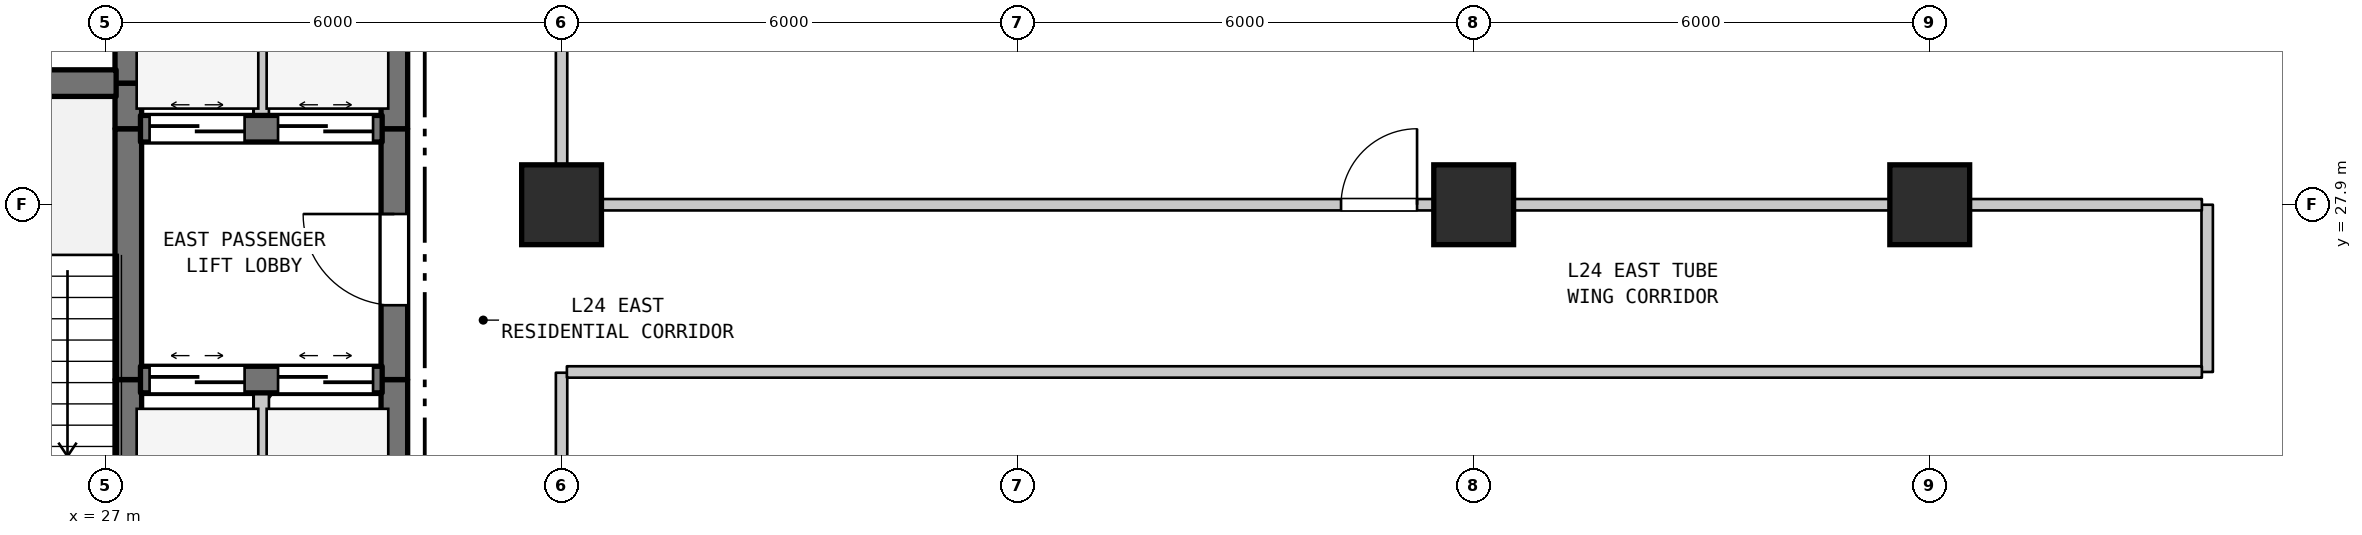
"""IFC4 building model, lengths in metres.
Left out: names, types, materials, properties, quantities, classifications, styles, units other than length and angle.
Written with IfcOpenShell. Run it as: python <this file> out.ifc"""

import sys

from ifc_helpers import new_model, si_unit, direction, frame, frame_2d, origin, origin_2d, place, context, subcontext, project, spatial, rectangle, extrude, element, fill, save


model = new_model("IFC4")
c1 = context("Model", 3, precision=1e-05, world=origin(), true_north=direction((0.0, 1.0)))
c2 = subcontext(c1, "Body", "Model", "MODEL_VIEW")
j1 = project(units=[si_unit("LENGTHUNIT", "METRE"), si_unit("PLANEANGLEUNIT", "RADIAN")], contexts=[c1])
p1 = place(None, origin())
s1 = spatial("IfcSite", under=j1, at=p1, CompositionType="ELEMENT")
p2 = place(p1, origin())
s2 = spatial("IfcBuilding", under=s1, at=p2, CompositionType="ELEMENT")
p3 = place(p2, frame((0.0, 0.0, 102.0)))
s3 = spatial("IfcBuildingStorey", under=s2, at=p3, CompositionType="ELEMENT", Elevation=102.0)
for number, where, z_axis, x_axis in (
    (1, (33.0, 27.9, 0.0), (0.0, 0.0, 1.0), (1.0, 0.0, 0.0)),
    (2, (45.0, 27.9, 0.0), (0.0, 0.0, 1.0), (1.0, 0.0, 0.0)),
    (3, (51.0, 27.9, 0.0), (0.0, 0.0, 1.0), (1.0, 0.0, 0.0)),
):
    element("IfcColumn", number, at=place(p3, frame(where, z_axis=z_axis, x_axis=x_axis)), inside=s3, PredefinedType="COLUMN", context=c2, shape_type="SweptSolid", body=[
        extrude(rectangle(XDim=1.05, YDim=1.05, at=origin_2d()), origin(), (0.0, 0.0, 1.0), 3.7),
    ])
p4 = place(p3, frame((27.3, 22.7, 0.0), z_axis=(0.0, 0.0, 1.0), x_axis=(0.0, 1.0, 0.0)))
e4 = element("IfcWall", 4, at=p4, inside=s3, PredefinedType="SHEAR", context=c2, shape_type="SweptSolid", body=[
    extrude(rectangle(XDim=2.9, YDim=0.35, at=frame_2d((1.45, 0.0))), origin(), (0.0, 0.0, 1.0), 3.385),
])
p5 = place(p3, frame((27.3, 25.6, 0.0), z_axis=(0.0, 0.0, 1.0), x_axis=(0.0, 1.0, 0.0)))
e5 = element("IfcWall", 5, at=p5, inside=s3, PredefinedType="SHEAR", context=c2, shape_type="SweptSolid", body=[
    extrude(rectangle(XDim=3.3, YDim=0.35, at=frame_2d((1.65, 0.0))), origin(), (0.0, 0.0, 1.0), 3.385),
])
p6 = place(p3, frame((27.3, 28.9, 0.0), z_axis=(0.0, 0.0, 1.0), x_axis=(0.0, 1.0, 0.0)))
e6 = element("IfcWall", 6, at=p6, inside=s3, PredefinedType="SHEAR", context=c2, shape_type="SweptSolid", body=[
    extrude(rectangle(XDim=0.6, YDim=0.35, at=frame_2d((0.3, 0.0))), origin(), (0.0, 0.0, 1.0), 3.385),
])
p7 = place(p3, frame((27.3, 29.5, 0.0), z_axis=(0.0, 0.0, 1.0), x_axis=(0.0, 1.0, 0.0)))
e7 = element("IfcWall", 7, at=p7, inside=s3, PredefinedType="SHEAR", context=c2, shape_type="SweptSolid", body=[
    extrude(rectangle(XDim=2.0, YDim=0.35, at=frame_2d((1.0, 0.0))), origin(), (0.0, 0.0, 1.0), 3.385),
])
p8 = place(p3, frame((29.05, 22.7, 0.0), z_axis=(0.0, 0.0, 1.0), x_axis=(0.0, 1.0, 0.0)))
e8 = element("IfcWall", 8, at=p8, inside=s3, PredefinedType="STANDARD", context=c2, shape_type="SweptSolid", body=[
    extrude(rectangle(XDim=2.9, YDim=0.2, at=frame_2d((1.45, 0.0))), origin(), (0.0, 0.0, 1.0), 3.385),
])
p9 = place(p3, frame((29.05, 28.9, 0.0), z_axis=(0.0, 0.0, 1.0), x_axis=(0.0, 1.0, 0.0)))
e9 = element("IfcWall", 9, at=p9, inside=s3, PredefinedType="STANDARD", context=c2, shape_type="SweptSolid", body=[
    extrude(rectangle(XDim=2.6, YDim=0.2, at=frame_2d((1.3, 0.0))), origin(), (0.0, 0.0, 1.0), 3.385),
])
p10 = place(p3, frame((30.8, 22.7, 0.0), z_axis=(0.0, 0.0, 1.0), x_axis=(0.0, 1.0, 0.0)))
e10 = element("IfcWall", 10, at=p10, inside=s3, PredefinedType="SHEAR", context=c2, shape_type="SweptSolid", body=[
    extrude(rectangle(XDim=2.9, YDim=0.35, at=frame_2d((1.45, 0.0))), origin(), (0.0, 0.0, 1.0), 3.385),
])
p11 = place(p3, frame((30.8, 25.6, 0.0), z_axis=(0.0, 0.0, 1.0), x_axis=(0.0, 1.0, 0.0)))
e11 = element("IfcWall", 11, at=p11, inside=s3, PredefinedType="SHEAR", context=c2, shape_type="SweptSolid", body=[
    extrude(rectangle(XDim=3.3, YDim=0.35, at=frame_2d((1.65, 0.0))), origin(), (0.0, 0.0, 1.0), 3.385),
])
p12 = place(p11, frame((0.978, 0.0, 0.0)))
e12 = element("IfcOpeningElement", 12, at=p12, cuts=e11, PredefinedType="OPENING", context=c2, shape_type="SweptSolid", body=[
    extrude(rectangle(XDim=1.2, YDim=2.2, at=frame_2d((0.6, 1.1))), frame((0.0, 0.185, 0.0), z_axis=(0.0, -1.0, 0.0), x_axis=(1.0, 0.0, 0.0)), (0.0, 0.0, 1.0), 0.37),
])
p13 = place(p3, frame((30.8, 28.9, 0.0), z_axis=(0.0, 0.0, 1.0), x_axis=(0.0, 1.0, 0.0)))
e13 = element("IfcWall", 13, at=p13, inside=s3, PredefinedType="SHEAR", context=c2, shape_type="SweptSolid", body=[
    extrude(rectangle(XDim=2.6, YDim=0.35, at=frame_2d((1.3, 0.0))), origin(), (0.0, 0.0, 1.0), 3.385),
])
p14 = place(p3, frame((33.0, 19.51, 0.0), z_axis=(0.0, 0.0, 1.0), x_axis=(0.0, 1.0, 0.0)))
e14 = element("IfcWall", 14, at=p14, inside=s3, PredefinedType="STANDARD", context=c2, shape_type="SweptSolid", body=[
    extrude(rectangle(XDim=6.18, YDim=0.15, at=frame_2d((3.09, 0.0))), origin(), (0.0, 0.0, 1.0), 2.935),
])
p15 = place(p3, frame((33.0, 27.91, 0.0), z_axis=(0.0, 0.0, 1.0), x_axis=(0.0, 1.0, 0.0)))
e15 = element("IfcWall", 15, at=p15, inside=s3, PredefinedType="STANDARD", context=c2, shape_type="SweptSolid", body=[
    extrude(rectangle(XDim=9.98, YDim=0.15, at=frame_2d((4.99, 0.0))), origin(), (0.0, 0.0, 1.0), 2.885),
])
p16 = place(p3, frame((54.65, 25.7, 0.0), z_axis=(0.0, 0.0, 1.0), x_axis=(0.0, 1.0, 0.0)))
e16 = element("IfcWall", 16, at=p16, inside=s3, PredefinedType="STANDARD", context=c2, shape_type="SweptSolid", body=[
    extrude(rectangle(XDim=2.2, YDim=0.15, at=frame_2d((1.1, 0.0))), origin(), (0.0, 0.0, 1.0), 3.385),
])
p17 = place(p3, frame((27.46, 25.6, 0.0), z_axis=(0.0, 0.0, 1.0), x_axis=(1.0, 0.0, 0.0)))
e17 = element("IfcWall", 17, at=p17, inside=s3, PredefinedType="SHEAR", context=c2, shape_type="SweptSolid", body=[
    extrude(rectangle(XDim=3.18, YDim=0.35, at=frame_2d((1.59, 0.0))), origin(), (0.0, 0.0, 1.0), 3.385),
])
p18 = place(p17, frame((0.12, 0.0, 0.0)))
e18 = element("IfcOpeningElement", 18, at=p18, cuts=e17, PredefinedType="OPENING", context=c2, shape_type="SweptSolid", body=[
    extrude(rectangle(XDim=1.25, YDim=2.2, at=frame_2d((0.625, 1.1))), frame((0.0, 0.185, 0.0), z_axis=(0.0, -1.0, 0.0), x_axis=(1.0, 0.0, 0.0)), (0.0, 0.0, 1.0), 0.37),
])
p19 = place(p17, frame((1.81, 0.0, 0.0)))
e19 = element("IfcOpeningElement", 19, at=p19, cuts=e17, PredefinedType="OPENING", context=c2, shape_type="SweptSolid", body=[
    extrude(rectangle(XDim=1.25, YDim=2.2, at=frame_2d((0.625, 1.1))), frame((0.0, 0.185, 0.0), z_axis=(0.0, -1.0, 0.0), x_axis=(1.0, 0.0, 0.0)), (0.0, 0.0, 1.0), 0.37),
])
p20 = place(p3, frame((33.07, 25.7, 0.0), z_axis=(0.0, 0.0, 1.0), x_axis=(1.0, 0.0, 0.0)))
e20 = element("IfcWall", 20, at=p20, inside=s3, PredefinedType="STANDARD", context=c2, shape_type="SweptSolid", body=[
    extrude(rectangle(XDim=21.51, YDim=0.15, at=frame_2d((10.755, 0.0))), origin(), (0.0, 0.0, 1.0), 3.385),
])
p21 = place(p3, frame((33.07, 27.9, 0.0), z_axis=(0.0, 0.0, 1.0), x_axis=(1.0, 0.0, 0.0)))
e21 = element("IfcWall", 21, at=p21, inside=s3, PredefinedType="STANDARD", context=c2, shape_type="SweptSolid", body=[
    extrude(rectangle(XDim=11.93, YDim=0.15, at=frame_2d((5.965, 0.0))), origin(), (0.0, 0.0, 1.0), 2.885),
])
p22 = place(p21, frame((10.185, 0.0, 0.0)))
e22 = element("IfcOpeningElement", 22, at=p22, cuts=e21, PredefinedType="OPENING", context=c2, shape_type="SweptSolid", body=[
    extrude(rectangle(XDim=1.0, YDim=2.15, at=frame_2d((0.5, 1.075))), frame((0.0, 0.085, 0.0), z_axis=(0.0, -1.0, 0.0), x_axis=(1.0, 0.0, 0.0)), (0.0, 0.0, 1.0), 0.17),
])
p23 = place(p3, frame((27.46, 28.9, 0.0), z_axis=(0.0, 0.0, 1.0), x_axis=(1.0, 0.0, 0.0)))
e23 = element("IfcWall", 23, at=p23, inside=s3, PredefinedType="SHEAR", context=c2, shape_type="SweptSolid", body=[
    extrude(rectangle(XDim=3.18, YDim=0.35, at=frame_2d((1.59, 0.0))), origin(), (0.0, 0.0, 1.0), 3.385),
])
p24 = place(p23, frame((0.12, 0.0, 0.0)))
e24 = element("IfcOpeningElement", 24, at=p24, cuts=e23, PredefinedType="OPENING", context=c2, shape_type="SweptSolid", body=[
    extrude(rectangle(XDim=1.25, YDim=2.2, at=frame_2d((0.625, 1.1))), frame((0.0, 0.185, 0.0), z_axis=(0.0, -1.0, 0.0), x_axis=(1.0, 0.0, 0.0)), (0.0, 0.0, 1.0), 0.37),
])
p25 = place(p23, frame((1.81, 0.0, 0.0)))
e25 = element("IfcOpeningElement", 25, at=p25, cuts=e23, PredefinedType="OPENING", context=c2, shape_type="SweptSolid", body=[
    extrude(rectangle(XDim=1.25, YDim=2.2, at=frame_2d((0.625, 1.1))), frame((0.0, 0.185, 0.0), z_axis=(0.0, -1.0, 0.0), x_axis=(1.0, 0.0, 0.0)), (0.0, 0.0, 1.0), 0.37),
])
p26 = place(p3, frame((23.96, 29.5, 0.0), z_axis=(0.0, 0.0, 1.0), x_axis=(1.0, 0.0, 0.0)))
e26 = element("IfcWall", 26, at=p26, inside=s3, PredefinedType="SHEAR", context=c2, shape_type="SweptSolid", body=[
    extrude(rectangle(XDim=3.18, YDim=0.35, at=frame_2d((1.59, 0.0))), origin(), (0.0, 0.0, 1.0), 3.385),
])
p27 = place(p3, frame((45.0, 27.9, 0.0), z_axis=(0.0, 0.0, 1.0), x_axis=(1.0, 0.0, 0.0)))
e27 = element("IfcWall", 27, at=p27, inside=s3, PredefinedType="STANDARD", context=c2, shape_type="SweptSolid", body=[
    extrude(rectangle(XDim=9.58, YDim=0.15, at=frame_2d((4.79, 0.0))), origin(), (0.0, 0.0, 1.0), 2.935),
])
p28 = place(p12, origin())
e28 = element("IfcDoor", 28, at=p28, inside=s3, OperationType="SINGLE_SWING_RIGHT", PredefinedType="DOOR", context=c2, shape_type="SweptSolid", body=[
    extrude(rectangle(XDim=1.2, YDim=2.2, at=frame_2d((0.6, 1.1))), frame((0.0, 0.025, 0.0), z_axis=(0.0, -1.0, 0.0), x_axis=(1.0, 0.0, 0.0)), (0.0, 0.0, 1.0), 0.05),
])
fill(e12, e28)
p29 = place(p18, origin())
e29 = element("IfcDoor", 29, at=p29, inside=s3, OperationType="DOUBLE_DOOR_SLIDING", PredefinedType="DOOR", context=c2, shape_type="SweptSolid", body=[
    extrude(rectangle(XDim=1.25, YDim=2.2, at=frame_2d((0.625, 1.1))), frame((0.0, 0.025, 0.0), z_axis=(0.0, -1.0, 0.0), x_axis=(1.0, 0.0, 0.0)), (0.0, 0.0, 1.0), 0.05),
])
fill(e18, e29)
p30 = place(p19, origin())
e30 = element("IfcDoor", 30, at=p30, inside=s3, OperationType="DOUBLE_DOOR_SLIDING", PredefinedType="DOOR", context=c2, shape_type="SweptSolid", body=[
    extrude(rectangle(XDim=1.25, YDim=2.2, at=frame_2d((0.625, 1.1))), frame((0.0, 0.025, 0.0), z_axis=(0.0, -1.0, 0.0), x_axis=(1.0, 0.0, 0.0)), (0.0, 0.0, 1.0), 0.05),
])
fill(e19, e30)
p31 = place(p22, origin())
e31 = element("IfcDoor", 31, at=p31, inside=s3, OperationType="SINGLE_SWING_RIGHT", PredefinedType="DOOR", context=c2, shape_type="SweptSolid", body=[
    extrude(rectangle(XDim=1.0, YDim=2.15, at=frame_2d((0.5, 1.075))), frame((0.0, 0.025, 0.0), z_axis=(0.0, -1.0, 0.0), x_axis=(1.0, 0.0, 0.0)), (0.0, 0.0, 1.0), 0.05),
])
fill(e22, e31)
p32 = place(p24, origin())
e32 = element("IfcDoor", 32, at=p32, inside=s3, OperationType="DOUBLE_DOOR_SLIDING", PredefinedType="DOOR", context=c2, shape_type="SweptSolid", body=[
    extrude(rectangle(XDim=1.25, YDim=2.2, at=frame_2d((0.625, 1.1))), frame((0.0, 0.025, 0.0), z_axis=(0.0, -1.0, 0.0), x_axis=(1.0, 0.0, 0.0)), (0.0, 0.0, 1.0), 0.05),
])
fill(e24, e32)
p33 = place(p25, origin())
e33 = element("IfcDoor", 33, at=p33, inside=s3, OperationType="DOUBLE_DOOR_SLIDING", PredefinedType="DOOR", context=c2, shape_type="SweptSolid", body=[
    extrude(rectangle(XDim=1.25, YDim=2.2, at=frame_2d((0.625, 1.1))), frame((0.0, 0.025, 0.0), z_axis=(0.0, -1.0, 0.0), x_axis=(1.0, 0.0, 0.0)), (0.0, 0.0, 1.0), 0.05),
])
fill(e25, e33)
save(model, sys.argv[1])
